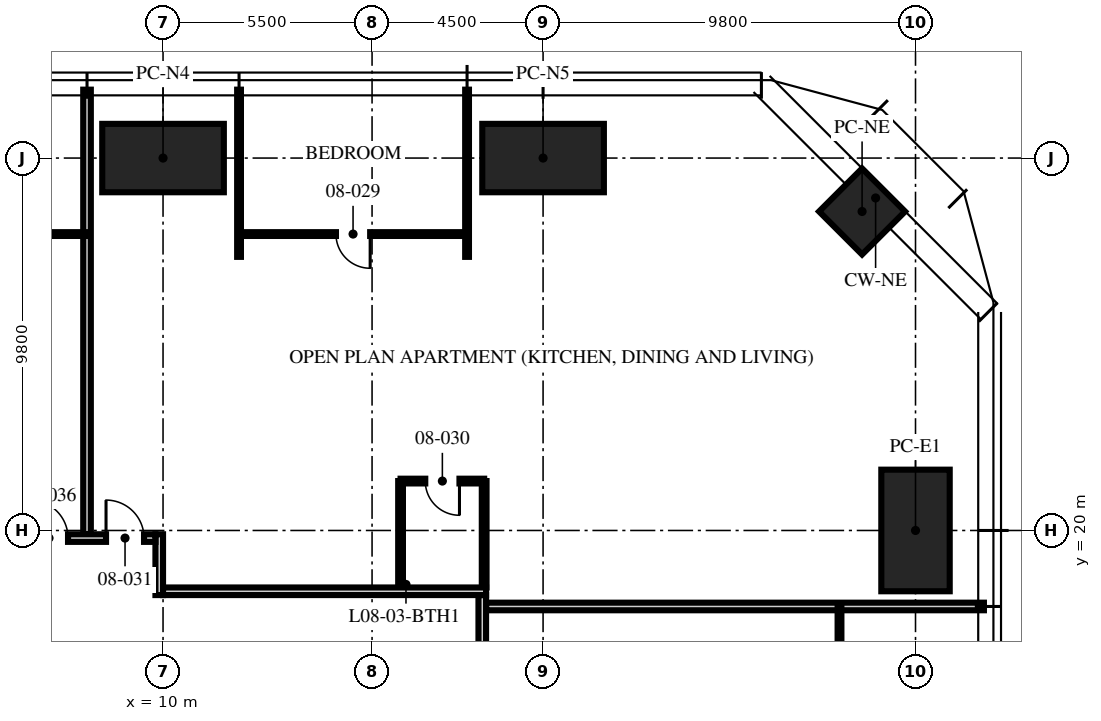
"""IFC4 building model, lengths in metres.
Left out: names, types, materials, properties, quantities, classifications, styles, units other than length and angle.
Written with IfcOpenShell. Run it as: python <this file> out.ifc"""

import sys

from ifc_helpers import new_model, si_unit, direction, frame, frame_2d, origin, origin_2d, place, context, subcontext, project, spatial, rectangle, hollow_rectangle, extrude, element, fill, save


model = new_model("IFC4")
c1 = context("Model", 3, precision=1e-05, world=origin(), true_north=direction((0.0, 1.0)))
c2 = subcontext(c1, "Body", "Model", "MODEL_VIEW")
j1 = project(units=[si_unit("LENGTHUNIT", "METRE"), si_unit("PLANEANGLEUNIT", "RADIAN")], contexts=[c1])
p1 = place(None, origin())
s1 = spatial("IfcSite", under=j1, at=p1, CompositionType="ELEMENT")
p2 = place(p1, origin())
s2 = spatial("IfcBuilding", under=s1, at=p2, CompositionType="ELEMENT")
p3 = place(p2, frame((0.0, 0.0, 36.0)))
s3 = spatial("IfcBuildingStorey", under=s2, at=p3, CompositionType="ELEMENT", Elevation=36.0)
for number, where, z_axis, x_axis in (
    (1, (10.0, 29.8, 0.0), (0.0, 0.0, 1.0), (1.0, 0.0, 0.0)),
    (2, (20.0, 29.8, 0.0), (0.0, 0.0, 1.0), (1.0, 0.0, 0.0)),
    (3, (29.8, 20.0, 0.0), (0.0, 0.0, 1.0), (0.0, 1.0, 0.0)),
):
    element("IfcColumn", number, at=place(p3, frame(where, z_axis=z_axis, x_axis=x_axis)), inside=s3, PredefinedType="COLUMN", context=c2, shape_type="SweptSolid", body=[
        extrude(hollow_rectangle(XDim=3.2, YDim=1.8, WallThickness=0.2, at=origin_2d()), origin(), (0.0, 0.0, 1.0), 3.75),
    ])
p4 = place(p3, frame((28.394, 28.394, 0.0), z_axis=(0.0, 0.0, 1.0), x_axis=(0.707106781187, -0.707106781187, 0.0)))
e4 = element("IfcColumn", 4, at=p4, inside=s3, PredefinedType="COLUMN", context=c2, shape_type="SweptSolid", body=[
    extrude(hollow_rectangle(XDim=1.6, YDim=1.6, WallThickness=0.1, at=origin_2d()), origin(), (0.0, 0.0, 1.0), 3.75),
])
p5 = place(p3, frame((18.5, 18.0, 0.0), z_axis=(0.0, 0.0, 1.0), x_axis=(1.0, 0.0, 0.0)))
e5 = element("IfcWall", 5, at=p5, inside=s3, PredefinedType="PARTITIONING", context=c2, shape_type="SweptSolid", body=[
    extrude(rectangle(XDim=13.1, YDim=0.2, at=frame_2d((6.55, 0.0))), origin(), (0.0, 0.0, 1.0), 2.3),
])
for number, where, z_axis, x_axis in (
    (6, (18.0, 27.2, 0.0), (0.0, 0.0, 1.0), (0.0, 1.0, 0.0)),
    (7, (12.0, 27.2, 0.0), (0.0, 0.0, 1.0), (0.0, 1.0, 0.0)),
):
    element("IfcWall", number, at=place(p3, frame(where, z_axis=z_axis, x_axis=x_axis)), inside=s3, PredefinedType="PARTITIONING", context=c2, shape_type="SweptSolid", body=[
        extrude(rectangle(XDim=4.4, YDim=0.1, at=frame_2d((2.2, 0.0))), origin(), (0.0, 0.0, 1.0), 2.71),
    ])
p6 = place(p3, frame((8.0, 19.9, 0.0), z_axis=(0.0, 0.0, 1.0), x_axis=(0.0, 1.0, 0.0)))
e8 = element("IfcWall", 8, at=p6, inside=s3, PredefinedType="PARTITIONING", context=c2, shape_type="SweptSolid", body=[
    extrude(rectangle(XDim=11.7, YDim=0.2, at=frame_2d((5.85, 0.0))), origin(), (0.0, 0.0, 1.0), 2.71),
])
p7 = place(p3, frame((27.8, 12.0, 0.0), z_axis=(0.0, 0.0, 1.0), x_axis=(0.0, 1.0, 0.0)))
e9 = element("IfcWall", 9, at=p7, inside=s3, PredefinedType="PARTITIONING", context=c2, shape_type="SweptSolid", body=[
    extrude(rectangle(XDim=6.0, YDim=0.1, at=frame_2d((3.0, 0.0))), origin(), (0.0, 0.0, 1.0), 2.61),
])
p8 = place(p7, frame((2.55, 0.0, 0.0)))
e10 = element("IfcOpeningElement", 10, at=p8, cuts=e9, PredefinedType="OPENING", context=c2, shape_type="SweptSolid", body=[
    extrude(rectangle(XDim=0.9, YDim=2.1, at=frame_2d((0.45, 1.05))), frame((0.0, 0.06, 0.0), z_axis=(0.0, -1.0, 0.0), x_axis=(1.0, 0.0, 0.0)), (0.0, 0.0, 1.0), 0.12),
])
p9 = place(p3, frame((18.0, 27.8, 0.0), z_axis=(0.0, 0.0, 1.0), x_axis=(-1.0, 0.0, 0.0)))
e11 = element("IfcWall", 11, at=p9, inside=s3, PredefinedType="PARTITIONING", context=c2, shape_type="SweptSolid", body=[
    extrude(rectangle(XDim=6.0, YDim=0.1, at=frame_2d((3.0, 0.0))), origin(), (0.0, 0.0, 1.0), 2.61),
])
p10 = place(p9, frame((2.55, 0.0, 0.0)))
e12 = element("IfcOpeningElement", 12, at=p10, cuts=e11, PredefinedType="OPENING", context=c2, shape_type="SweptSolid", body=[
    extrude(rectangle(XDim=0.9, YDim=2.1, at=frame_2d((0.45, 1.05))), frame((0.0, 0.06, 0.0), z_axis=(0.0, -1.0, 0.0), x_axis=(1.0, 0.0, 0.0)), (0.0, 0.0, 1.0), 0.12),
])
p11 = place(p3, frame((18.45, 21.3, 0.0), z_axis=(0.0, 0.0, 1.0), x_axis=(-1.0, 0.0, 0.0)))
e13 = element("IfcWall", 13, at=p11, inside=s3, PredefinedType="PARTITIONING", context=c2, shape_type="SweptSolid", body=[
    extrude(rectangle(XDim=2.2, YDim=0.125, at=frame_2d((1.1, 0.0))), origin(), (0.0, 0.0, 1.0), 3.5),
])
p12 = place(p11, frame((0.65, 0.0, 0.0)))
e14 = element("IfcOpeningElement", 14, at=p12, cuts=e13, PredefinedType="OPENING", context=c2, shape_type="SweptSolid", body=[
    extrude(rectangle(XDim=0.9, YDim=2.1, at=frame_2d((0.45, 1.05))), frame((0.0, 0.073, 0.0), z_axis=(0.0, -1.0, 0.0), x_axis=(1.0, 0.0, 0.0)), (0.0, 0.0, 1.0), 0.145),
])
p13 = place(p3, frame((18.45, 18.5, 0.0), z_axis=(0.0, 0.0, 1.0), x_axis=(0.0, 1.0, 0.0)))
e15 = element("IfcWall", 15, at=p13, inside=s3, PredefinedType="PARTITIONING", context=c2, shape_type="SweptSolid", body=[
    extrude(rectangle(XDim=2.8, YDim=0.125, at=frame_2d((1.4, 0.0))), origin(), (0.0, 0.0, 1.0), 2.3),
])
p14 = place(p3, frame((16.25, 18.5, 0.0), z_axis=(0.0, 0.0, 1.0), x_axis=(0.0, 1.0, 0.0)))
e16 = element("IfcWall", 16, at=p14, inside=s3, PredefinedType="PARTITIONING", context=c2, shape_type="SweptSolid", body=[
    extrude(rectangle(XDim=2.8, YDim=0.125, at=frame_2d((1.4, 0.0))), origin(), (0.0, 0.0, 1.0), 3.5),
])
p15 = place(p3, frame((8.0, 27.8, 0.0), z_axis=(0.0, 0.0, 1.0), x_axis=(-1.0, 0.0, 0.0)))
e17 = element("IfcWall", 17, at=p15, inside=s3, PredefinedType="PARTITIONING", context=c2, shape_type="SweptSolid", body=[
    extrude(rectangle(XDim=6.0, YDim=0.1, at=frame_2d((3.0, 0.0))), origin(), (0.0, 0.0, 1.0), 2.61),
])
p16 = place(p15, frame((2.55, 0.0, 0.0)))
e18 = element("IfcOpeningElement", 18, at=p16, cuts=e17, PredefinedType="OPENING", context=c2, shape_type="SweptSolid", body=[
    extrude(rectangle(XDim=0.9, YDim=2.1, at=frame_2d((0.45, 1.05))), frame((0.0, 0.06, 0.0), z_axis=(0.0, -1.0, 0.0), x_axis=(1.0, 0.0, 0.0)), (0.0, 0.0, 1.0), 0.12),
])
p17 = place(p3, frame((18.4, 0.0, 0.0), z_axis=(0.0, 0.0, 1.0), x_axis=(0.0, 1.0, 0.0)))
e19 = element("IfcWall", 19, at=p17, inside=s3, PredefinedType="PARTITIONING", context=c2, shape_type="SweptSolid", body=[
    extrude(rectangle(XDim=18.3, YDim=0.2, at=frame_2d((9.15, 0.0))), origin(), (0.0, 0.0, 1.0), 2.3),
])
p18 = place(p3, frame((9.9, 18.3, 0.0), z_axis=(0.0, 0.0, 1.0), x_axis=(0.0, 1.0, 0.0)))
e20 = element("IfcWall", 20, at=p18, inside=s3, PredefinedType="PARTITIONING", context=c2, shape_type="SweptSolid", body=[
    extrude(rectangle(XDim=1.6, YDim=0.2, at=frame_2d((0.8, 0.0))), origin(), (0.0, 0.0, 1.0), 2.492),
])
p19 = place(p3, frame((6.2, 19.8, 0.0), z_axis=(0.0, 0.0, 1.0), x_axis=(1.0, 0.0, 0.0)))
e21 = element("IfcWall", 21, at=p19, inside=s3, PredefinedType="PARTITIONING", context=c2, shape_type="SweptSolid", body=[
    extrude(rectangle(XDim=3.6, YDim=0.2, at=frame_2d((1.8, 0.0))), origin(), (0.0, 0.0, 1.0), 3.5),
])
p20 = place(p19, frame((2.3, 0.0, 0.0)))
e22 = element("IfcOpeningElement", 22, at=p20, cuts=e21, PredefinedType="OPENING", context=c2, shape_type="SweptSolid", body=[
    extrude(rectangle(XDim=1.0, YDim=2.2, at=frame_2d((0.5, 1.1))), frame((0.0, 0.11, 0.0), z_axis=(0.0, -1.0, 0.0), x_axis=(1.0, 0.0, 0.0)), (0.0, 0.0, 1.0), 0.22),
])
p21 = place(p19, frame((0.3, 0.0, 0.0)))
e23 = element("IfcOpeningElement", 23, at=p21, cuts=e21, PredefinedType="OPENING", context=c2, shape_type="SweptSolid", body=[
    extrude(rectangle(XDim=1.0, YDim=2.2, at=frame_2d((0.5, 1.1))), frame((0.0, 0.11, 0.0), z_axis=(0.0, -1.0, 0.0), x_axis=(1.0, 0.0, 0.0)), (0.0, 0.0, 1.0), 0.22),
])
p22 = place(p3, frame((10.0, 18.4, 0.0), z_axis=(0.0, 0.0, 1.0), x_axis=(1.0, 0.0, 0.0)))
e24 = element("IfcWall", 24, at=p22, inside=s3, PredefinedType="PARTITIONING", context=c2, shape_type="SweptSolid", body=[
    extrude(rectangle(XDim=8.5, YDim=0.2, at=frame_2d((4.25, 0.0))), origin(), (0.0, 0.0, 1.0), 2.3),
])
p23 = place(p10, origin())
e25 = element("IfcDoor", 25, at=p23, inside=s3, OperationType="SINGLE_SWING_LEFT", PredefinedType="DOOR", context=c2, shape_type="SweptSolid", body=[
    extrude(rectangle(XDim=0.9, YDim=2.1, at=frame_2d((0.45, 1.05))), frame((0.0, 0.025, 0.0), z_axis=(0.0, -1.0, 0.0), x_axis=(1.0, 0.0, 0.0)), (0.0, 0.0, 1.0), 0.05),
])
fill(e12, e25)
p24 = place(p12, origin())
e26 = element("IfcDoor", 26, at=p24, inside=s3, OperationType="SINGLE_SWING_LEFT", PredefinedType="DOOR", context=c2, shape_type="SweptSolid", body=[
    extrude(rectangle(XDim=0.9, YDim=2.1, at=frame_2d((0.45, 1.05))), frame((0.0, 0.025, 0.0), z_axis=(0.0, -1.0, 0.0), x_axis=(1.0, 0.0, 0.0)), (0.0, 0.0, 1.0), 0.05),
])
fill(e14, e26)
p25 = place(p20, origin())
e27 = element("IfcDoor", 27, at=p25, inside=s3, OperationType="SINGLE_SWING_LEFT", PredefinedType="DOOR", context=c2, shape_type="SweptSolid", body=[
    extrude(rectangle(XDim=1.0, YDim=2.2, at=frame_2d((0.5, 1.1))), frame((0.0, 0.025, 0.0), z_axis=(0.0, -1.0, 0.0), x_axis=(1.0, 0.0, 0.0)), (0.0, 0.0, 1.0), 0.05),
])
fill(e22, e27)
p26 = place(p21, origin())
e28 = element("IfcDoor", 28, at=p26, inside=s3, OperationType="SINGLE_SWING_LEFT", PredefinedType="DOOR", context=c2, shape_type="SweptSolid", body=[
    extrude(rectangle(XDim=1.0, YDim=2.2, at=frame_2d((0.5, 1.1))), frame((0.0, 0.025, 0.0), z_axis=(0.0, -1.0, 0.0), x_axis=(1.0, 0.0, 0.0)), (0.0, 0.0, 1.0), 0.05),
])
fill(e23, e28)
save(model, sys.argv[1])
